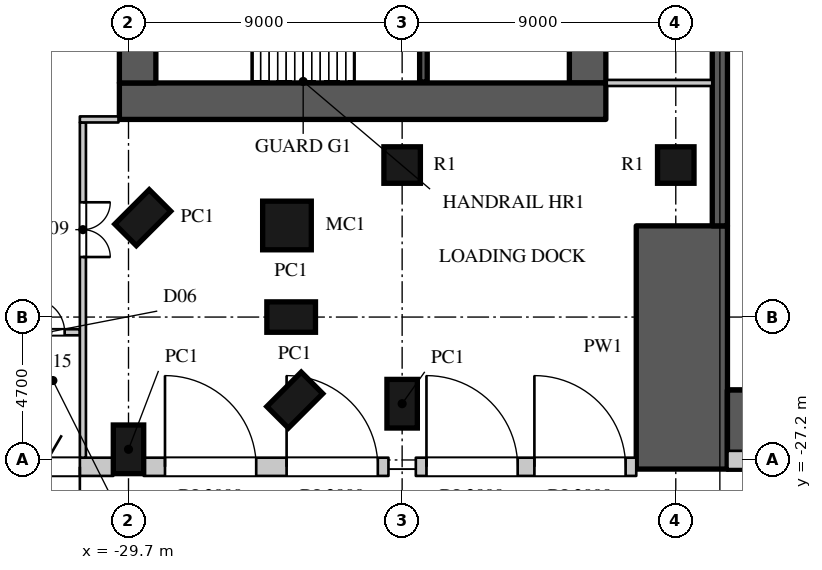
"""IFC4 building model, lengths in metres.
Left out: names, types, materials, properties, quantities, classifications, styles, units other than length and angle.
Written with IfcOpenShell. Run it as: python <this file> out.ifc"""

import sys

from ifc_helpers import new_model, si_unit, direction, frame, frame_2d, origin, origin_2d, place, context, subcontext, project, spatial, polyline, rectangle, circle, outline, extrude, element, fill, save


model = new_model("IFC4")
c1 = context("Model", 3, precision=1e-05, world=origin(), true_north=direction((0.0, 1.0)))
c2 = subcontext(c1, "Body", "Model", "MODEL_VIEW")
j1 = project(units=[si_unit("LENGTHUNIT", "METRE"), si_unit("PLANEANGLEUNIT", "RADIAN")], contexts=[c1])
p1 = place(None, origin())
s1 = spatial("IfcSite", under=j1, at=p1, CompositionType="ELEMENT")
p2 = place(p1, origin())
s2 = spatial("IfcBuilding", under=s1, at=p2, CompositionType="ELEMENT")
p3 = place(p2, origin())
s3 = spatial("IfcBuildingStorey", under=s2, at=p3, CompositionType="ELEMENT", Elevation=0.0)
p4 = place(p3, frame((-11.5, -27.5, 0.0), z_axis=(0.0, 0.0, 1.0), x_axis=(0.0, 1.0, 0.0)))
e1 = element("IfcWall", 1, at=p4, inside=s3, PredefinedType="SOLIDWALL", context=c2, shape_type="SweptSolid", body=[
    extrude(rectangle(XDim=8.0, YDim=3.0, at=frame_2d((4.0, 0.0))), origin(), (0.0, 0.0, 1.0), 9.0),
])
p5 = place(p3, frame((-10.25, -19.5, 0.0), z_axis=(0.0, 0.0, 1.0), x_axis=(0.0, 1.0, 0.0)))
e2 = element("IfcWall", 2, at=p5, inside=s3, PredefinedType="SOLIDWALL", context=c2, shape_type="SweptSolid", body=[
    extrude(rectangle(XDim=39.0, YDim=0.5, at=frame_2d((19.5, 0.0))), origin(), (0.0, 0.0, 1.0), 9.0),
])
p6 = place(p5, frame((6.0, 0.0, 0.0)))
e3 = element("IfcOpeningElement", 3, at=p6, cuts=e2, PredefinedType="OPENING", context=c2, shape_type="SweptSolid", body=[
    extrude(rectangle(XDim=2.0, YDim=2.7, at=frame_2d((1.0, 1.35))), frame((0.0, 0.26, 0.0), z_axis=(0.0, -1.0, 0.0), x_axis=(1.0, 0.0, 0.0)), (0.0, 0.0, 1.0), 0.52),
])
p7 = place(p5, frame((31.0, 0.0, 0.0)))
e4 = element("IfcOpeningElement", 4, at=p7, cuts=e2, PredefinedType="OPENING", context=c2, shape_type="SweptSolid", body=[
    extrude(rectangle(XDim=2.0, YDim=2.7, at=frame_2d((1.0, 1.35))), frame((0.0, 0.26, 0.0), z_axis=(0.0, -1.0, 0.0), x_axis=(1.0, 0.0, 0.0)), (0.0, 0.0, 1.0), 0.52),
])
p8 = place(p3, frame((-10.0, -27.2, 0.0), z_axis=(0.0, 0.0, 1.0), x_axis=(1.0, 0.0, 0.0)))
e5 = element("IfcWall", 5, at=p8, inside=s3, PredefinedType="SOLIDWALL", context=c2, shape_type="SweptSolid", body=[
    extrude(outline(polyline([(24.0, 11.553), (18.661, 23.543), (15.919, 22.326), (18.264, 24.131), (17.882, 24.696), (17.248, 25.422), (16.575, 26.079), (16.345, 26.278), (15.85, 26.664), (15.061, 27.167), (14.198, 27.573), (13.259, 27.854), (12.757, 27.94), (12.262, 27.983), (11.738, 27.983), (11.243, 27.94), (10.741, 27.854), (9.802, 27.573), (8.939, 27.167), (8.15, 26.664), (7.655, 26.278), (7.425, 26.079), (6.752, 25.422), (6.118, 24.696), (5.736, 24.131), (8.081, 22.326), (5.339, 23.543), (0.0, 11.553), (0.0, 28.6), (24.0, 28.6), (24.0, 11.553)])), frame((0.0, 0.3, 0.0), z_axis=(0.0, -1.0, 0.0), x_axis=(1.0, 0.0, 0.0)), (0.0, 0.0, 1.0), 0.6),
])
p9 = place(p3, frame((-10.0, -26.2, 0.0), z_axis=(0.0, 0.0, 1.0), x_axis=(1.0, 0.0, 0.0)))
e6 = element("IfcWall", 6, at=p9, inside=s3, PredefinedType="SOLIDWALL", context=c2, shape_type="SweptSolid", body=[
    extrude(outline(polyline([(2.5, 9.332), (2.0, 7.639), (1.5, 5.859), (1.0, 3.993), (0.5, 2.04), (0.0, 0.0), (0.0, 11.553), (2.74, 10.333), (2.977, 10.865), (2.5, 9.332)])), frame((0.0, 1.3, 0.0), z_axis=(0.0, -1.0, 0.0), x_axis=(1.0, 0.0, 0.0)), (0.0, 0.0, 1.0), 2.6),
])
p10 = place(p3, frame((-29.231, -19.231, 0.0), z_axis=(0.0, 0.0, 1.0), x_axis=(0.707106781187, -0.707106781187, 0.0)))
e7 = element("IfcColumn", 7, at=p10, inside=s3, PredefinedType="COLUMN", context=c2, shape_type="SweptSolid", body=[
    extrude(rectangle(XDim=1.0, YDim=1.6, at=origin_2d()), origin(), (0.0, 0.0, 1.0), 9.0),
])
p11 = place(p3, frame((-24.488, -19.488, 0.0), z_axis=(0.0, 0.0, 1.0), x_axis=(1.0, 0.0, 0.0)))
e8 = element("IfcColumn", 8, at=p11, inside=s3, PredefinedType="COLUMN", context=c2, shape_type="SweptSolid", body=[
    extrude(circle(Radius=0.8, at=origin_2d()), origin(), (0.0, 0.0, 1.0), 9.0),
])
for number, where, z_axis, x_axis in (
    (9, (-24.35, -22.5, 0.0), (0.0, 0.0, 1.0), (0.0, -1.0, 0.0)),
    (10, (-24.231, -25.231, 0.0), (0.0, 0.0, 1.0), (0.707, -0.707, 0.0)),
    (11, (-20.7, -25.35, 0.0), (0.0, 0.0, 1.0), (1.0, 0.0, 0.0)),
    (12, (-29.7, -26.85, 0.0), (0.0, 0.0, 1.0), (1.0, 0.0, 0.0)),
):
    element("IfcColumn", number, at=place(p3, frame(where, z_axis=z_axis, x_axis=x_axis)), inside=s3, PredefinedType="COLUMN", context=c2, shape_type="SweptSolid", body=[
        extrude(rectangle(XDim=1.0, YDim=1.6, at=origin_2d()), origin(), (0.0, 0.0, 1.0), 9.0),
    ])
for number, where, z_axis, x_axis in (
    (13, (-20.7, -17.5, 0.0), (0.0, 0.0, 1.0), (1.0, 0.0, 0.0)),
    (14, (-11.7, -17.5, 0.0), (0.0, 0.0, 1.0), (1.0, 0.0, 0.0)),
):
    element("IfcColumn", number, at=place(p3, frame(where, z_axis=z_axis, x_axis=x_axis)), inside=s3, PredefinedType="COLUMN", context=c2, shape_type="SweptSolid", body=[
        extrude(circle(Radius=0.6, at=origin_2d()), origin(), (0.0, 0.0, 1.0), 9.0),
    ])
p12 = place(p3, frame((-30.2, -27.425, 0.0), z_axis=(0.0, 0.0, 1.0), x_axis=(-1.0, 0.0, 0.0)))
e15 = element("IfcWall", 15, at=p12, inside=s3, PredefinedType="ELEMENTEDWALL", context=c2, shape_type="SweptSolid", body=[
    extrude(rectangle(XDim=7.793, YDim=0.6, at=frame_2d((3.896, 0.0))), origin(), (0.0, 0.0, 1.0), 8.6),
])
p13 = place(p12, frame((1.1, 0.0, 0.0)))
e16 = element("IfcOpeningElement", 16, at=p13, cuts=e15, PredefinedType="OPENING", context=c2, shape_type="SweptSolid", body=[
    extrude(rectangle(XDim=2.4, YDim=3.0, at=frame_2d((1.2, 1.5))), frame((0.0, 0.31, 0.0), z_axis=(0.0, -1.0, 0.0), x_axis=(1.0, 0.0, 0.0)), (0.0, 0.0, 1.0), 0.62),
])
p14 = place(p3, frame((-29.2, -27.425, 0.0), z_axis=(0.0, 0.0, 1.0), x_axis=(1.0, 0.0, 0.0)))
e17 = element("IfcWall", 17, at=p14, inside=s3, PredefinedType="ELEMENTEDWALL", context=c2, shape_type="SweptSolid", body=[
    extrude(rectangle(XDim=8.05, YDim=0.6, at=frame_2d((4.025, 0.0))), origin(), (0.0, 0.0, 1.0), 8.6),
])
p15 = place(p14, frame((0.7, 0.0, 0.0)))
e18 = element("IfcOpeningElement", 18, at=p15, cuts=e17, PredefinedType="OPENING", context=c2, shape_type="SweptSolid", body=[
    extrude(rectangle(XDim=3.0, YDim=3.6, at=frame_2d((1.5, 1.8))), frame((0.0, 0.31, 0.0), z_axis=(0.0, -1.0, 0.0), x_axis=(1.0, 0.0, 0.0)), (0.0, 0.0, 1.0), 0.62),
])
p16 = place(p14, frame((4.7, 0.0, 0.0)))
e19 = element("IfcOpeningElement", 19, at=p16, cuts=e17, PredefinedType="OPENING", context=c2, shape_type="SweptSolid", body=[
    extrude(rectangle(XDim=3.0, YDim=3.6, at=frame_2d((1.5, 1.8))), frame((0.0, 0.31, 0.0), z_axis=(0.0, -1.0, 0.0), x_axis=(1.0, 0.0, 0.0)), (0.0, 0.0, 1.0), 0.62),
])
p17 = place(p3, frame((-20.25, -27.425, 0.0), z_axis=(0.0, 0.0, 1.0), x_axis=(1.0, 0.0, 0.0)))
e20 = element("IfcWall", 20, at=p17, inside=s3, PredefinedType="ELEMENTEDWALL", context=c2, shape_type="SweptSolid", body=[
    extrude(rectangle(XDim=7.25, YDim=0.6, at=frame_2d((3.625, 0.0))), origin(), (0.0, 0.0, 1.0), 8.6),
])
p18 = place(p17, frame((0.35, 0.0, 0.0)))
e21 = element("IfcOpeningElement", 21, at=p18, cuts=e20, PredefinedType="OPENING", context=c2, shape_type="SweptSolid", body=[
    extrude(rectangle(XDim=3.0, YDim=3.6, at=frame_2d((1.5, 1.8))), frame((0.0, 0.31, 0.0), z_axis=(0.0, -1.0, 0.0), x_axis=(1.0, 0.0, 0.0)), (0.0, 0.0, 1.0), 0.62),
])
p19 = place(p17, frame((3.9, 0.0, 0.0)))
e22 = element("IfcOpeningElement", 22, at=p19, cuts=e20, PredefinedType="OPENING", context=c2, shape_type="SweptSolid", body=[
    extrude(rectangle(XDim=3.0, YDim=3.6, at=frame_2d((1.5, 1.8))), frame((0.0, 0.31, 0.0), z_axis=(0.0, -1.0, 0.0), x_axis=(1.0, 0.0, 0.0)), (0.0, 0.0, 1.0), 0.62),
])
p20 = place(p3, frame((-30.0, -15.4, 0.0), z_axis=(0.0, 0.0, 1.0), x_axis=(1.0, 0.0, 0.0)))
e23 = element("IfcWall", 23, at=p20, inside=s3, PredefinedType="SHEAR", context=c2, shape_type="SweptSolid", body=[
    extrude(rectangle(XDim=16.0, YDim=1.2, at=frame_2d((8.0, 0.0))), origin(), (0.0, 0.0, 1.0), 9.0),
])
p21 = place(p3, frame((-14.6, -14.8, 0.0), z_axis=(0.0, 0.0, 1.0), x_axis=(0.0, 1.0, 0.0)))
e24 = element("IfcWall", 24, at=p21, inside=s3, PredefinedType="SHEAR", context=c2, shape_type="SweptSolid", body=[
    extrude(rectangle(XDim=29.6, YDim=1.2, at=frame_2d((14.8, 0.0))), origin(), (0.0, 0.0, 1.0), 9.0),
])
p22 = place(p21, frame((1.55, 0.0, 0.0)))
e25 = element("IfcOpeningElement", 25, at=p22, cuts=e24, PredefinedType="OPENING", context=c2, shape_type="SweptSolid", body=[
    extrude(rectangle(XDim=1.5, YDim=2.4, at=frame_2d((0.75, 1.2))), frame((0.0, 0.61, 0.0), z_axis=(0.0, -1.0, 0.0), x_axis=(1.0, 0.0, 0.0)), (0.0, 0.0, 1.0), 1.22),
])
p23 = place(p21, frame((26.55, 0.0, 0.0)))
e26 = element("IfcOpeningElement", 26, at=p23, cuts=e24, PredefinedType="OPENING", context=c2, shape_type="SweptSolid", body=[
    extrude(rectangle(XDim=1.5, YDim=2.4, at=frame_2d((0.75, 1.2))), frame((0.0, 0.61, 0.0), z_axis=(0.0, -1.0, 0.0), x_axis=(1.0, 0.0, 0.0)), (0.0, 0.0, 1.0), 1.22),
])
p24 = place(p21, frame((8.45, 0.0, 0.0)))
e27 = element("IfcOpeningElement", 27, at=p24, cuts=e24, PredefinedType="OPENING", context=c2, shape_type="SweptSolid", body=[
    extrude(rectangle(XDim=1.5, YDim=2.4, at=frame_2d((0.75, 1.2))), frame((0.0, 0.61, 0.0), z_axis=(0.0, -1.0, 0.0), x_axis=(1.0, 0.0, 0.0)), (0.0, 0.0, 1.0), 1.22),
])
p25 = place(p21, frame((19.65, 0.0, 0.0)))
e28 = element("IfcOpeningElement", 28, at=p25, cuts=e24, PredefinedType="OPENING", context=c2, shape_type="SweptSolid", body=[
    extrude(rectangle(XDim=1.5, YDim=2.4, at=frame_2d((0.75, 1.2))), frame((0.0, 0.61, 0.0), z_axis=(0.0, -1.0, 0.0), x_axis=(1.0, 0.0, 0.0)), (0.0, 0.0, 1.0), 1.22),
])
p26 = place(p21, frame((14.5, 0.0, 0.0)))
e29 = element("IfcOpeningElement", 29, at=p26, cuts=e24, PredefinedType="OPENING", context=c2, shape_type="SweptSolid", body=[
    extrude(rectangle(XDim=0.6, YDim=2.0, at=frame_2d((0.3, 1.0))), frame((0.0, 0.61, 0.0), z_axis=(0.0, -1.0, 0.0), x_axis=(1.0, 0.0, 0.0)), (0.0, 0.0, 1.0), 1.22),
])
p27 = place(p3, frame((-29.4, -14.8, 0.0), z_axis=(0.0, 0.0, 1.0), x_axis=(0.0, 1.0, 0.0)))
e30 = element("IfcWall", 30, at=p27, inside=s3, PredefinedType="SHEAR", context=c2, shape_type="SweptSolid", body=[
    extrude(rectangle(XDim=4.6, YDim=1.2, at=frame_2d((2.3, 0.0))), origin(), (0.0, 0.0, 1.0), 9.0),
])
p28 = place(p3, frame((-33.05, -23.0, 0.0), z_axis=(0.0, 0.0, 1.0), x_axis=(1.0, 0.0, 0.0)))
e31 = element("IfcWall", 31, at=p28, inside=s3, PredefinedType="PARTITIONING", context=c2, shape_type="SweptSolid", body=[
    extrude(rectangle(XDim=1.75, YDim=0.2, at=frame_2d((0.875, 0.0))), origin(), (0.0, 0.0, 1.0), 8.598),
])
p29 = place(p28, frame((0.15, 0.0, 0.0)))
e32 = element("IfcOpeningElement", 32, at=p29, cuts=e31, PredefinedType="OPENING", context=c2, shape_type="SweptSolid", body=[
    extrude(rectangle(XDim=1.1, YDim=2.2, at=frame_2d((0.55, 1.1))), frame((0.0, 0.11, 0.0), z_axis=(0.0, -1.0, 0.0), x_axis=(1.0, 0.0, 0.0)), (0.0, 0.0, 1.0), 0.22),
])
p30 = place(p3, frame((-31.2, -27.125, 0.0), z_axis=(0.0, 0.0, 1.0), x_axis=(0.0, 1.0, 0.0)))
e33 = element("IfcWall", 33, at=p30, inside=s3, PredefinedType="PARTITIONING", context=c2, shape_type="SweptSolid", body=[
    extrude(rectangle(XDim=11.025, YDim=0.2, at=frame_2d((5.512, 0.0))), origin(), (0.0, 0.0, 1.0), 8.598),
])
p31 = place(p30, frame((6.6, 0.0, 0.0)))
e34 = element("IfcOpeningElement", 34, at=p31, cuts=e33, PredefinedType="OPENING", context=c2, shape_type="SweptSolid", body=[
    extrude(rectangle(XDim=1.8, YDim=2.4, at=frame_2d((0.9, 1.2))), frame((0.0, 0.11, 0.0), z_axis=(0.0, -1.0, 0.0), x_axis=(1.0, 0.0, 0.0)), (0.0, 0.0, 1.0), 0.22),
])
p32 = place(p3, frame((-31.3, -16.0, 0.0), z_axis=(0.0, 0.0, 1.0), x_axis=(1.0, 0.0, 0.0)))
e35 = element("IfcWall", 35, at=p32, inside=s3, PredefinedType="PARTITIONING", context=c2, shape_type="SweptSolid", body=[
    extrude(rectangle(XDim=1.27, YDim=0.2, at=frame_2d((0.635, 0.0))), origin(), (0.0, 0.0, 1.0), 8.598),
])
p33 = place(p3, frame((-13.97, -14.8, 0.0), z_axis=(0.0, 0.0, 1.0), x_axis=(1.0, 0.0, 0.0)))
e36 = element("IfcWall", 36, at=p33, inside=s3, PredefinedType="PARTITIONING", context=c2, shape_type="SweptSolid", body=[
    extrude(rectangle(XDim=3.47, YDim=0.2, at=frame_2d((1.735, 0.0))), origin(), (0.0, 0.0, 1.0), 8.598),
])
p34 = place(p3, frame((-20.0, -14.77, 0.0), z_axis=(0.0, 0.0, 1.0), x_axis=(0.0, 1.0, 0.0)))
e37 = element("IfcWall", 37, at=p34, inside=s3, PredefinedType="SHEAR", context=c2, shape_type="SweptSolid", body=[
    extrude(rectangle(XDim=4.445, YDim=0.25, at=frame_2d((2.223, 0.0))), origin(), (0.0, 0.0, 1.0), 8.598),
])
p35 = place(p34, frame((1.7, 0.0, 0.0)))
e38 = element("IfcOpeningElement", 38, at=p35, cuts=e37, PredefinedType="OPENING", context=c2, shape_type="SweptSolid", body=[
    extrude(rectangle(XDim=1.1, YDim=2.2, at=frame_2d((0.55, 1.1))), frame((0.0, 0.135, 0.0), z_axis=(0.0, -1.0, 0.0), x_axis=(1.0, 0.0, 0.0)), (0.0, 0.0, 1.0), 0.27),
])
p36 = place(p13, origin())
e39 = element("IfcDoor", 39, at=p36, inside=s3, OperationType="DOUBLE_DOOR_SINGLE_SWING", PredefinedType="DOOR", context=c2, shape_type="SweptSolid", body=[
    extrude(rectangle(XDim=2.4, YDim=3.0, at=frame_2d((1.2, 1.5))), frame((0.0, -0.05, 0.0), z_axis=(0.0, -1.0, 0.0), x_axis=(1.0, 0.0, 0.0)), (0.0, 0.0, 1.0), 0.05),
])
fill(e16, e39)
p37 = place(p15, origin())
e40 = element("IfcDoor", 40, at=p37, inside=s3, OperationType="ROLLINGUP", PredefinedType="DOOR", context=c2, shape_type="SweptSolid", body=[
    extrude(rectangle(XDim=3.0, YDim=3.6, at=frame_2d((1.5, 1.8))), frame((0.0, -0.05, 0.0), z_axis=(0.0, -1.0, 0.0), x_axis=(1.0, 0.0, 0.0)), (0.0, 0.0, 1.0), 0.05),
])
fill(e18, e40)
p38 = place(p16, origin())
e41 = element("IfcDoor", 41, at=p38, inside=s3, OperationType="ROLLINGUP", PredefinedType="DOOR", context=c2, shape_type="SweptSolid", body=[
    extrude(rectangle(XDim=3.0, YDim=3.6, at=frame_2d((1.5, 1.8))), frame((0.0, -0.05, 0.0), z_axis=(0.0, -1.0, 0.0), x_axis=(1.0, 0.0, 0.0)), (0.0, 0.0, 1.0), 0.05),
])
fill(e19, e41)
p39 = place(p18, origin())
e42 = element("IfcDoor", 42, at=p39, inside=s3, OperationType="ROLLINGUP", PredefinedType="DOOR", context=c2, shape_type="SweptSolid", body=[
    extrude(rectangle(XDim=3.0, YDim=3.6, at=frame_2d((1.5, 1.8))), frame((0.0, -0.05, 0.0), z_axis=(0.0, -1.0, 0.0), x_axis=(1.0, 0.0, 0.0)), (0.0, 0.0, 1.0), 0.05),
])
fill(e21, e42)
p40 = place(p19, origin())
e43 = element("IfcDoor", 43, at=p40, inside=s3, OperationType="ROLLINGUP", PredefinedType="DOOR", context=c2, shape_type="SweptSolid", body=[
    extrude(rectangle(XDim=3.0, YDim=3.6, at=frame_2d((1.5, 1.8))), frame((0.0, -0.05, 0.0), z_axis=(0.0, -1.0, 0.0), x_axis=(1.0, 0.0, 0.0)), (0.0, 0.0, 1.0), 0.05),
])
fill(e22, e43)
p41 = place(p31, origin())
e44 = element("IfcDoor", 44, at=p41, inside=s3, OperationType="DOUBLE_DOOR_SINGLE_SWING", PredefinedType="DOOR", context=c2, shape_type="SweptSolid", body=[
    extrude(rectangle(XDim=1.8, YDim=2.4, at=frame_2d((0.9, 1.2))), frame((0.0, 0.025, 0.0), z_axis=(0.0, -1.0, 0.0), x_axis=(1.0, 0.0, 0.0)), (0.0, 0.0, 1.0), 0.05),
])
fill(e34, e44)
p42 = place(p29, origin())
e45 = element("IfcDoor", 45, at=p42, inside=s3, OperationType="SINGLE_SWING_LEFT", PredefinedType="DOOR", context=c2, shape_type="SweptSolid", body=[
    extrude(rectangle(XDim=1.1, YDim=2.2, at=frame_2d((0.55, 1.1))), frame((0.0, 0.025, 0.0), z_axis=(0.0, -1.0, 0.0), x_axis=(1.0, 0.0, 0.0)), (0.0, 0.0, 1.0), 0.05),
])
fill(e32, e45)
save(model, sys.argv[1])
